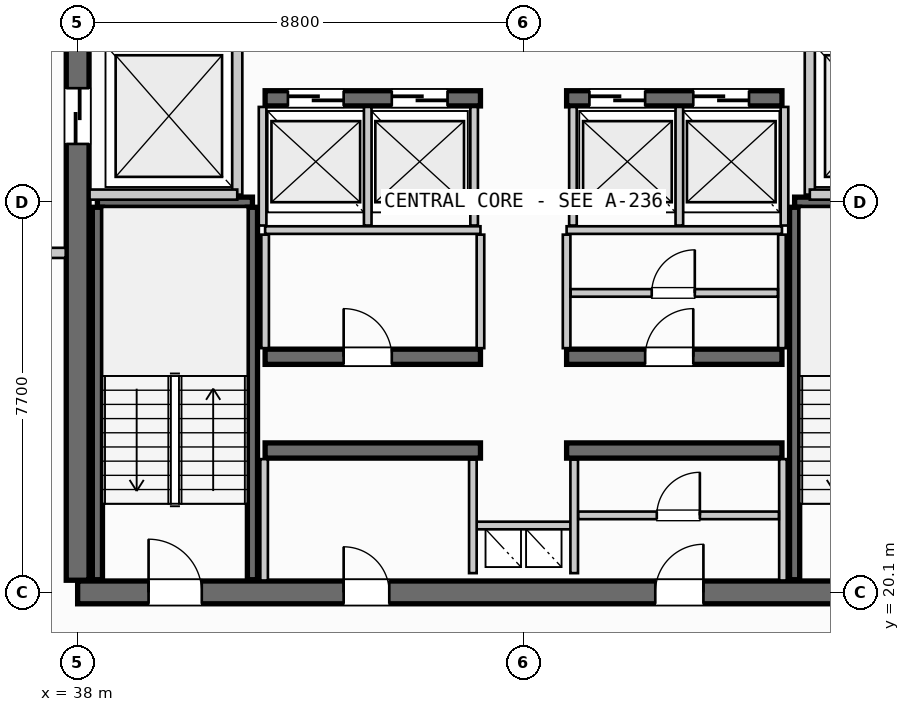
"""IFC4 building model, lengths in metres.
Left out: names, types, materials, properties, quantities, classifications, styles, units other than length and angle.
Written with IfcOpenShell. Run it as: python <this file> out.ifc"""

import sys

from ifc_helpers import new_model, si_unit, direction, frame, frame_2d, origin, place, context, subcontext, project, spatial, rectangle, extrude, source, transform, mapped, element, fill, save


model = new_model("IFC4")
c1 = context("Model", 3, precision=1e-05, world=origin(), true_north=direction((0.0, 1.0)))
c2 = subcontext(c1, "Body", "Model", "MODEL_VIEW")
j1 = project(units=[si_unit("LENGTHUNIT", "METRE"), si_unit("PLANEANGLEUNIT", "RADIAN")], contexts=[c1])
p1 = place(None, origin())
s1 = spatial("IfcSite", under=j1, at=p1, CompositionType="ELEMENT")
p2 = place(p1, origin())
s2 = spatial("IfcBuilding", under=s1, at=p2, CompositionType="ELEMENT")
p3 = place(p2, frame((0.0, 0.0, 259.45)))
s3 = spatial("IfcBuildingStorey", under=s2, at=p3, CompositionType="ELEMENT", Elevation=259.45)
p4 = place(p3, frame((38.0, 20.1, 0.0), z_axis=(0.0, 0.0, 1.0), x_axis=(1.0, 0.0, 0.0)))
e1 = element("IfcWall", 1, at=p4, inside=s3, PredefinedType="SHEAR", context=c2, shape_type="SweptSolid", body=[
    extrude(rectangle(XDim=17.6, YDim=0.45, at=frame_2d((8.8, 0.0))), origin(), (0.0, 0.0, 1.0), 3.21),
])
p5 = place(p4, frame((1.4, 0.0, 0.0)))
e2 = element("IfcOpeningElement", 2, at=p5, cuts=e1, PredefinedType="OPENING", context=c2, shape_type="SweptSolid", body=[
    extrude(rectangle(XDim=1.05, YDim=2.15, at=frame_2d((0.525, 1.075))), frame((0.0, 0.235, 0.0), z_axis=(0.0, -1.0, 0.0), x_axis=(1.0, 0.0, 0.0)), (0.0, 0.0, 1.0), 0.47),
])
p6 = place(p4, frame((15.15, 0.0, 0.0)))
e3 = element("IfcOpeningElement", 3, at=p6, cuts=e1, PredefinedType="OPENING", context=c2, shape_type="SweptSolid", body=[
    extrude(rectangle(XDim=1.05, YDim=2.15, at=frame_2d((0.525, 1.075))), frame((0.0, 0.235, 0.0), z_axis=(0.0, -1.0, 0.0), x_axis=(1.0, 0.0, 0.0)), (0.0, 0.0, 1.0), 0.47),
])
p7 = place(p4, frame((5.25, 0.0, 0.0)))
e4 = element("IfcOpeningElement", 4, at=p7, cuts=e1, PredefinedType="OPENING", context=c2, shape_type="SweptSolid", body=[
    extrude(rectangle(XDim=0.9, YDim=2.15, at=frame_2d((0.45, 1.075))), frame((0.0, 0.235, 0.0), z_axis=(0.0, -1.0, 0.0), x_axis=(1.0, 0.0, 0.0)), (0.0, 0.0, 1.0), 0.47),
])
p8 = place(p4, frame((11.4, 0.0, 0.0)))
e5 = element("IfcOpeningElement", 5, at=p8, cuts=e1, PredefinedType="OPENING", context=c2, shape_type="SweptSolid", body=[
    extrude(rectangle(XDim=0.95, YDim=2.15, at=frame_2d((0.475, 1.075))), frame((0.0, 0.235, 0.0), z_axis=(0.0, -1.0, 0.0), x_axis=(1.0, 0.0, 0.0)), (0.0, 0.0, 1.0), 0.47),
])
p9 = place(p3, frame((38.0, 35.26, 0.0), z_axis=(0.0, 0.0, 1.0), x_axis=(0.0, -1.0, 0.0)))
e6 = element("IfcWall", 6, at=p9, inside=s3, PredefinedType="SHEAR", context=c2, shape_type="SweptSolid", body=[
    extrude(rectangle(XDim=14.92, YDim=0.45, at=frame_2d((7.46, 0.0))), origin(), (0.0, 0.0, 1.0), 3.21),
])
p10 = place(p9, frame((5.21, 0.0, 0.0)))
e7 = element("IfcOpeningElement", 7, at=p10, cuts=e6, PredefinedType="OPENING", context=c2, shape_type="SweptSolid", body=[
    extrude(rectangle(XDim=1.1, YDim=2.2, at=frame_2d((0.55, 1.1))), frame((0.0, 0.235, 0.0), z_axis=(0.0, -1.0, 0.0), x_axis=(1.0, 0.0, 0.0)), (0.0, 0.0, 1.0), 0.47),
])
for number, where, z_axis, x_axis in (
    (8, (41.7, 22.9, 0.0), (0.0, 0.0, 1.0), (1.0, 0.0, 0.0)),
    (9, (47.65, 22.9, 0.0), (0.0, 0.0, 1.0), (1.0, 0.0, 0.0)),
):
    element("IfcWall", number, at=place(p3, frame(where, z_axis=z_axis, x_axis=x_axis)), inside=s3, PredefinedType="SHEAR", context=c2, shape_type="SweptSolid", body=[
        extrude(rectangle(XDim=4.25, YDim=0.3, at=frame_2d((2.125, 0.0))), origin(), (0.0, 0.0, 1.0), 3.21),
    ])
p11 = place(p3, frame((41.7, 24.75, 0.0), z_axis=(0.0, 0.0, 1.0), x_axis=(1.0, 0.0, 0.0)))
e10 = element("IfcWall", 10, at=p11, inside=s3, PredefinedType="SHEAR", context=c2, shape_type="SweptSolid", body=[
    extrude(rectangle(XDim=4.25, YDim=0.3, at=frame_2d((2.125, 0.0))), origin(), (0.0, 0.0, 1.0), 3.21),
])
p12 = place(p11, frame((1.55, 0.0, 0.0)))
e11 = element("IfcOpeningElement", 11, at=p12, cuts=e10, PredefinedType="OPENING", context=c2, shape_type="SweptSolid", body=[
    extrude(rectangle(XDim=0.95, YDim=2.15, at=frame_2d((0.475, 1.075))), frame((0.0, 0.16, 0.0), z_axis=(0.0, -1.0, 0.0), x_axis=(1.0, 0.0, 0.0)), (0.0, 0.0, 1.0), 0.32),
])
p13 = place(p3, frame((47.65, 24.75, 0.0), z_axis=(0.0, 0.0, 1.0), x_axis=(1.0, 0.0, 0.0)))
e12 = element("IfcWall", 12, at=p13, inside=s3, PredefinedType="SHEAR", context=c2, shape_type="SweptSolid", body=[
    extrude(rectangle(XDim=4.25, YDim=0.3, at=frame_2d((2.125, 0.0))), origin(), (0.0, 0.0, 1.0), 3.21),
])
p14 = place(p13, frame((1.55, 0.0, 0.0)))
e13 = element("IfcOpeningElement", 13, at=p14, cuts=e12, PredefinedType="OPENING", context=c2, shape_type="SweptSolid", body=[
    extrude(rectangle(XDim=0.95, YDim=2.15, at=frame_2d((0.475, 1.075))), frame((0.0, 0.16, 0.0), z_axis=(0.0, -1.0, 0.0), x_axis=(1.0, 0.0, 0.0)), (0.0, 0.0, 1.0), 0.32),
])
p15 = place(p3, frame((41.7, 29.85, 0.0), z_axis=(0.0, 0.0, 1.0), x_axis=(1.0, 0.0, 0.0)))
e14 = element("IfcWall", 14, at=p15, inside=s3, PredefinedType="SHEAR", context=c2, shape_type="SweptSolid", body=[
    extrude(rectangle(XDim=4.25, YDim=0.3, at=frame_2d((2.125, 0.0))), origin(), (0.0, 0.0, 1.0), 3.21),
])
p16 = place(p15, frame((0.45, 0.0, 0.0)))
e15 = element("IfcOpeningElement", 15, at=p16, cuts=e14, PredefinedType="OPENING", context=c2, shape_type="SweptSolid", body=[
    extrude(rectangle(XDim=1.1, YDim=2.2, at=frame_2d((0.55, 1.1))), frame((0.0, 0.16, 0.0), z_axis=(0.0, -1.0, 0.0), x_axis=(1.0, 0.0, 0.0)), (0.0, 0.0, 1.0), 0.32),
])
p17 = place(p15, frame((2.5, 0.0, 0.0)))
e16 = element("IfcOpeningElement", 16, at=p17, cuts=e14, PredefinedType="OPENING", context=c2, shape_type="SweptSolid", body=[
    extrude(rectangle(XDim=1.1, YDim=2.2, at=frame_2d((0.55, 1.1))), frame((0.0, 0.16, 0.0), z_axis=(0.0, -1.0, 0.0), x_axis=(1.0, 0.0, 0.0)), (0.0, 0.0, 1.0), 0.32),
])
p18 = place(p3, frame((47.65, 29.85, 0.0), z_axis=(0.0, 0.0, 1.0), x_axis=(1.0, 0.0, 0.0)))
e17 = element("IfcWall", 17, at=p18, inside=s3, PredefinedType="SHEAR", context=c2, shape_type="SweptSolid", body=[
    extrude(rectangle(XDim=4.25, YDim=0.3, at=frame_2d((2.125, 0.0))), origin(), (0.0, 0.0, 1.0), 3.21),
])
p19 = place(p18, frame((0.45, 0.0, 0.0)))
e18 = element("IfcOpeningElement", 18, at=p19, cuts=e17, PredefinedType="OPENING", context=c2, shape_type="SweptSolid", body=[
    extrude(rectangle(XDim=1.1, YDim=2.2, at=frame_2d((0.55, 1.1))), frame((0.0, 0.16, 0.0), z_axis=(0.0, -1.0, 0.0), x_axis=(1.0, 0.0, 0.0)), (0.0, 0.0, 1.0), 0.32),
])
p20 = place(p18, frame((2.5, 0.0, 0.0)))
e19 = element("IfcOpeningElement", 19, at=p20, cuts=e17, PredefinedType="OPENING", context=c2, shape_type="SweptSolid", body=[
    extrude(rectangle(XDim=1.1, YDim=2.2, at=frame_2d((0.55, 1.1))), frame((0.0, 0.16, 0.0), z_axis=(0.0, -1.0, 0.0), x_axis=(1.0, 0.0, 0.0)), (0.0, 0.0, 1.0), 0.32),
])
p21 = place(p3, frame((38.39, 27.8, 0.0), z_axis=(0.0, 0.0, 1.0), x_axis=(1.0, 0.0, 0.0)))
e20 = element("IfcWall", 20, at=p21, inside=s3, PredefinedType="SHEAR", context=c2, shape_type="SweptSolid", body=[
    extrude(rectangle(XDim=3.06, YDim=0.2, at=frame_2d((1.53, 0.0))), origin(), (0.0, 0.0, 1.0), 3.21),
])
for number, where, z_axis, x_axis in (
    (21, (41.45, 27.7, 0.0), (0.0, 0.0, 1.0), (0.0, -1.0, 0.0)),
    (22, (38.39, 20.35, 0.0), (0.0, 0.0, 1.0), (0.0, 1.0, 0.0)),
):
    element("IfcWall", number, at=place(p3, frame(where, z_axis=z_axis, x_axis=x_axis)), inside=s3, PredefinedType="SHEAR", context=c2, shape_type="SweptSolid", body=[
        extrude(rectangle(XDim=7.35, YDim=0.2, at=frame_2d((3.675, 0.0))), origin(), (0.0, 0.0, 1.0), 3.21),
    ])
p22 = place(p3, frame((52.15, 27.8, 0.0), z_axis=(0.0, 0.0, 1.0), x_axis=(1.0, 0.0, 0.0)))
e23 = element("IfcWall", 23, at=p22, inside=s3, PredefinedType="SHEAR", context=c2, shape_type="SweptSolid", body=[
    extrude(rectangle(XDim=3.06, YDim=0.2, at=frame_2d((1.53, 0.0))), origin(), (0.0, 0.0, 1.0), 3.21),
])
p23 = place(p3, frame((52.15, 20.35, 0.0), z_axis=(0.0, 0.0, 1.0), x_axis=(0.0, 1.0, 0.0)))
e24 = element("IfcWall", 24, at=p23, inside=s3, PredefinedType="SHEAR", context=c2, shape_type="SweptSolid", body=[
    extrude(rectangle(XDim=7.35, YDim=0.2, at=frame_2d((3.675, 0.0))), origin(), (0.0, 0.0, 1.0), 3.21),
])
p24 = place(p3, frame((45.8, 21.42, 0.0), z_axis=(0.0, 0.0, 1.0), x_axis=(1.0, 0.0, 0.0)))
e25 = element("IfcWall", 25, at=p24, inside=s3, PredefinedType="PARTITIONING", context=c2, shape_type="SweptSolid", body=[
    extrude(rectangle(XDim=2.0, YDim=0.15, at=frame_2d((1.0, 0.0))), origin(), (0.0, 0.0, 1.0), 2.735),
])
for number, where, z_axis, x_axis in (
    (26, (45.8, 20.48, 0.0), (0.0, 0.0, 1.0), (0.0, 1.0, 0.0)),
    (27, (47.8, 20.48, 0.0), (0.0, 0.0, 1.0), (0.0, 1.0, 0.0)),
):
    element("IfcWall", number, at=place(p3, frame(where, z_axis=z_axis, x_axis=x_axis)), inside=s3, PredefinedType="PARTITIONING", context=c2, shape_type="SweptSolid", body=[
        extrude(rectangle(XDim=2.24, YDim=0.15, at=frame_2d((1.12, 0.0))), origin(), (0.0, 0.0, 1.0), 2.735),
    ])
p25 = place(p3, frame((41.15, 27.95, 0.0), z_axis=(0.0, 0.0, 1.0), x_axis=(0.0, 1.0, 0.0)))
e28 = element("IfcWall", 28, at=p25, inside=s3, PredefinedType="PARTITIONING", context=c2, shape_type="SweptSolid", body=[
    extrude(rectangle(XDim=3.1, YDim=0.2, at=frame_2d((1.55, 0.0))), origin(), (0.0, 0.0, 1.0), 2.735),
])
p26 = place(p3, frame((38.235, 27.95, 0.0), z_axis=(0.0, 0.0, 1.0), x_axis=(1.0, 0.0, 0.0)))
e29 = element("IfcWall", 29, at=p26, inside=s3, PredefinedType="PARTITIONING", context=c2, shape_type="SweptSolid", body=[
    extrude(rectangle(XDim=2.915, YDim=0.2, at=frame_2d((1.458, 0.0))), origin(), (0.0, 0.0, 1.0), 2.735),
])
p27 = place(p3, frame((34.5, 26.8, 0.0), z_axis=(0.0, 0.0, 1.0), x_axis=(1.0, 0.0, 0.0)))
e30 = element("IfcWall", 30, at=p27, inside=s3, PredefinedType="PARTITIONING", context=c2, shape_type="SweptSolid", body=[
    extrude(rectangle(XDim=3.265, YDim=0.2, at=frame_2d((1.632, 0.0))), origin(), (0.0, 0.0, 1.0), 2.735),
])
p28 = place(p3, frame((52.45, 27.95, 0.0), z_axis=(0.0, 0.0, 1.0), x_axis=(0.0, 1.0, 0.0)))
e31 = element("IfcWall", 31, at=p28, inside=s3, PredefinedType="PARTITIONING", context=c2, shape_type="SweptSolid", body=[
    extrude(rectangle(XDim=3.1, YDim=0.2, at=frame_2d((1.55, 0.0))), origin(), (0.0, 0.0, 1.0), 2.735),
])
p29 = place(p3, frame((52.45, 27.95, 0.0), z_axis=(0.0, 0.0, 1.0), x_axis=(1.0, 0.0, 0.0)))
e32 = element("IfcWall", 32, at=p29, inside=s3, PredefinedType="PARTITIONING", context=c2, shape_type="SweptSolid", body=[
    extrude(rectangle(XDim=2.915, YDim=0.2, at=frame_2d((1.458, 0.0))), origin(), (0.0, 0.0, 1.0), 2.735),
])
for number, where, z_axis, x_axis in (
    (33, (41.68, 20.335, 0.0), (0.0, 0.0, 1.0), (0.0, 1.0, 0.0)),
    (34, (51.92, 20.335, 0.0), (0.0, 0.0, 1.0), (0.0, 1.0, 0.0)),
):
    element("IfcWall", number, at=place(p3, frame(where, z_axis=z_axis, x_axis=x_axis)), inside=s3, PredefinedType="PARTITIONING", context=c2, shape_type="SweptSolid", body=[
        extrude(rectangle(XDim=2.395, YDim=0.15, at=frame_2d((1.198, 0.0))), origin(), (0.0, 0.0, 1.0), 2.735),
    ])
p30 = place(p3, frame((47.88, 21.62, 0.0), z_axis=(0.0, 0.0, 1.0), x_axis=(1.0, 0.0, 0.0)))
e35 = element("IfcWall", 35, at=p30, inside=s3, PredefinedType="PARTITIONING", context=c2, shape_type="SweptSolid", body=[
    extrude(rectangle(XDim=3.96, YDim=0.15, at=frame_2d((1.98, 0.0))), origin(), (0.0, 0.0, 1.0), 2.735),
])
p31 = place(p30, frame((1.55, 0.0, 0.0)))
e36 = element("IfcOpeningElement", 36, at=p31, cuts=e35, PredefinedType="OPENING", context=c2, shape_type="SweptSolid", body=[
    extrude(rectangle(XDim=0.85, YDim=2.15, at=frame_2d((0.425, 1.075))), frame((0.0, 0.085, 0.0), z_axis=(0.0, -1.0, 0.0), x_axis=(1.0, 0.0, 0.0)), (0.0, 0.0, 1.0), 0.17),
])
for number, where, z_axis, x_axis in (
    (37, (41.7, 27.25, 0.0), (0.0, 0.0, 1.0), (1.0, 0.0, 0.0)),
    (38, (47.65, 27.25, 0.0), (0.0, 0.0, 1.0), (1.0, 0.0, 0.0)),
):
    element("IfcWall", number, at=place(p3, frame(where, z_axis=z_axis, x_axis=x_axis)), inside=s3, PredefinedType="PARTITIONING", context=c2, shape_type="SweptSolid", body=[
        extrude(rectangle(XDim=4.25, YDim=0.15, at=frame_2d((2.125, 0.0))), origin(), (0.0, 0.0, 1.0), 2.735),
    ])
for number, where, z_axis, x_axis in (
    (39, (41.7, 24.92, 0.0), (0.0, 0.0, 1.0), (0.0, 1.0, 0.0)),
    (40, (45.95, 24.92, 0.0), (0.0, 0.0, 1.0), (0.0, 1.0, 0.0)),
    (41, (47.65, 24.92, 0.0), (0.0, 0.0, 1.0), (0.0, 1.0, 0.0)),
    (42, (51.9, 24.92, 0.0), (0.0, 0.0, 1.0), (0.0, 1.0, 0.0)),
):
    element("IfcWall", number, at=place(p3, frame(where, z_axis=z_axis, x_axis=x_axis)), inside=s3, PredefinedType="PARTITIONING", context=c2, shape_type="SweptSolid", body=[
        extrude(rectangle(XDim=2.24, YDim=0.15, at=frame_2d((1.12, 0.0))), origin(), (0.0, 0.0, 1.0), 2.735),
    ])
p32 = place(p3, frame((47.73, 26.01, 0.0), z_axis=(0.0, 0.0, 1.0), x_axis=(1.0, 0.0, 0.0)))
e43 = element("IfcWall", 43, at=p32, inside=s3, PredefinedType="PARTITIONING", context=c2, shape_type="SweptSolid", body=[
    extrude(rectangle(XDim=4.09, YDim=0.15, at=frame_2d((2.045, 0.0))), origin(), (0.0, 0.0, 1.0), 2.735),
])
p33 = place(p32, frame((1.6, 0.0, 0.0)))
e44 = element("IfcOpeningElement", 44, at=p33, cuts=e43, PredefinedType="OPENING", context=c2, shape_type="SweptSolid", body=[
    extrude(rectangle(XDim=0.85, YDim=2.15, at=frame_2d((0.425, 1.075))), frame((0.0, 0.085, 0.0), z_axis=(0.0, -1.0, 0.0), x_axis=(1.0, 0.0, 0.0)), (0.0, 0.0, 1.0), 0.17),
])
for number, where, z_axis, x_axis in (
    (45, (41.65, 27.34, 0.0), (0.0, 0.0, 1.0), (0.0, 1.0, 0.0)),
    (46, (43.725, 27.34, 0.0), (0.0, 0.0, 1.0), (0.0, 1.0, 0.0)),
    (47, (45.825, 27.34, 0.0), (0.0, 0.0, 1.0), (0.0, 1.0, 0.0)),
    (48, (47.775, 27.34, 0.0), (0.0, 0.0, 1.0), (0.0, 1.0, 0.0)),
    (49, (49.875, 27.34, 0.0), (0.0, 0.0, 1.0), (0.0, 1.0, 0.0)),
    (50, (51.95, 27.34, 0.0), (0.0, 0.0, 1.0), (0.0, 1.0, 0.0)),
):
    element("IfcWall", number, at=place(p3, frame(where, z_axis=z_axis, x_axis=x_axis)), inside=s3, PredefinedType="PARTITIONING", context=c2, shape_type="SweptSolid", body=[
        extrude(rectangle(XDim=2.34, YDim=0.15, at=frame_2d((1.17, 0.0))), origin(), (0.0, 0.0, 1.0), 2.735),
    ])
m1 = source(origin(), c2, "Body", "SweptSolid", [
    extrude(rectangle(XDim=1.05, YDim=2.15, at=frame_2d((0.525, 1.075))), frame((0.0, 0.025, 0.0), z_axis=(0.0, -1.0, 0.0), x_axis=(1.0, 0.0, 0.0)), (0.0, 0.0, 1.0), 0.05),
])
p34 = place(p5, origin())
e51 = element("IfcDoor", 51, at=p34, inside=s3, OperationType="SINGLE_SWING_LEFT", PredefinedType="DOOR", context=c2, shape_type="MappedRepresentation", body=[
    mapped(m1, transform((0.0, 0.0, 0.0), scale=1.0)),
])
fill(e2, e51)
m2 = source(origin(), c2, "Body", "SweptSolid", [
    extrude(rectangle(XDim=1.1, YDim=2.2, at=frame_2d((0.55, 1.1))), frame((0.0, 0.025, 0.0), z_axis=(0.0, -1.0, 0.0), x_axis=(1.0, 0.0, 0.0)), (0.0, 0.0, 1.0), 0.05),
])
p35 = place(p10, origin())
e52 = element("IfcDoor", 52, at=p35, inside=s3, OperationType="SLIDING_TO_LEFT", PredefinedType="DOOR", context=c2, shape_type="MappedRepresentation", body=[
    mapped(m2, transform((0.0, 0.0, 0.0), scale=1.0)),
])
fill(e7, e52)
m3 = source(origin(), c2, "Body", "SweptSolid", [
    extrude(rectangle(XDim=0.9, YDim=2.15, at=frame_2d((0.45, 1.075))), frame((0.0, 0.025, 0.0), z_axis=(0.0, -1.0, 0.0), x_axis=(1.0, 0.0, 0.0)), (0.0, 0.0, 1.0), 0.05),
])
p36 = place(p7, origin())
e53 = element("IfcDoor", 53, at=p36, inside=s3, OperationType="SINGLE_SWING_LEFT", PredefinedType="DOOR", context=c2, shape_type="MappedRepresentation", body=[
    mapped(m3, transform((0.0, 0.0, 0.0), scale=1.0)),
])
fill(e4, e53)
m4 = source(origin(), c2, "Body", "SweptSolid", [
    extrude(rectangle(XDim=0.95, YDim=2.15, at=frame_2d((0.475, 1.075))), frame((0.0, 0.025, 0.0), z_axis=(0.0, -1.0, 0.0), x_axis=(1.0, 0.0, 0.0)), (0.0, 0.0, 1.0), 0.05),
])
p37 = place(p8, origin())
e54 = element("IfcDoor", 54, at=p37, inside=s3, OperationType="SINGLE_SWING_RIGHT", PredefinedType="DOOR", context=c2, shape_type="MappedRepresentation", body=[
    mapped(m4, transform((0.0, 0.0, 0.0), scale=1.0)),
])
fill(e5, e54)
p38 = place(p12, origin())
e55 = element("IfcDoor", 55, at=p38, inside=s3, OperationType="SINGLE_SWING_LEFT", PredefinedType="DOOR", context=c2, shape_type="MappedRepresentation", body=[
    mapped(m4, transform((0.0, 0.0, 0.0), scale=1.0)),
])
fill(e11, e55)
p39 = place(p14, origin())
e56 = element("IfcDoor", 56, at=p39, inside=s3, OperationType="SINGLE_SWING_RIGHT", PredefinedType="DOOR", context=c2, shape_type="MappedRepresentation", body=[
    mapped(m4, transform((0.0, 0.0, 0.0), scale=1.0)),
])
fill(e13, e56)
p40 = place(p16, origin())
e57 = element("IfcDoor", 57, at=p40, inside=s3, OperationType="SLIDING_TO_LEFT", PredefinedType="DOOR", context=c2, shape_type="MappedRepresentation", body=[
    mapped(m2, transform((0.0, 0.0, 0.0), scale=1.0)),
])
fill(e15, e57)
p41 = place(p17, origin())
e58 = element("IfcDoor", 58, at=p41, inside=s3, OperationType="SLIDING_TO_LEFT", PredefinedType="DOOR", context=c2, shape_type="MappedRepresentation", body=[
    mapped(m2, transform((0.0, 0.0, 0.0), scale=1.0)),
])
fill(e16, e58)
p42 = place(p19, origin())
e59 = element("IfcDoor", 59, at=p42, inside=s3, OperationType="SLIDING_TO_LEFT", PredefinedType="DOOR", context=c2, shape_type="MappedRepresentation", body=[
    mapped(m2, transform((0.0, 0.0, 0.0), scale=1.0)),
])
fill(e18, e59)
p43 = place(p20, origin())
e60 = element("IfcDoor", 60, at=p43, inside=s3, OperationType="SLIDING_TO_LEFT", PredefinedType="DOOR", context=c2, shape_type="MappedRepresentation", body=[
    mapped(m2, transform((0.0, 0.0, 0.0), scale=1.0)),
])
fill(e19, e60)
m5 = source(origin(), c2, "Body", "SweptSolid", [
    extrude(rectangle(XDim=0.85, YDim=2.15, at=frame_2d((0.425, 1.075))), frame((0.0, 0.025, 0.0), z_axis=(0.0, -1.0, 0.0), x_axis=(1.0, 0.0, 0.0)), (0.0, 0.0, 1.0), 0.05),
])
p44 = place(p31, origin())
e61 = element("IfcDoor", 61, at=p44, inside=s3, OperationType="SINGLE_SWING_RIGHT", PredefinedType="DOOR", context=c2, shape_type="MappedRepresentation", body=[
    mapped(m5, transform((0.0, 0.0, 0.0), scale=1.0)),
])
fill(e36, e61)
p45 = place(p33, origin())
e62 = element("IfcDoor", 62, at=p45, inside=s3, OperationType="SINGLE_SWING_RIGHT", PredefinedType="DOOR", context=c2, shape_type="MappedRepresentation", body=[
    mapped(m5, transform((0.0, 0.0, 0.0), scale=1.0)),
])
fill(e44, e62)
save(model, sys.argv[1])
